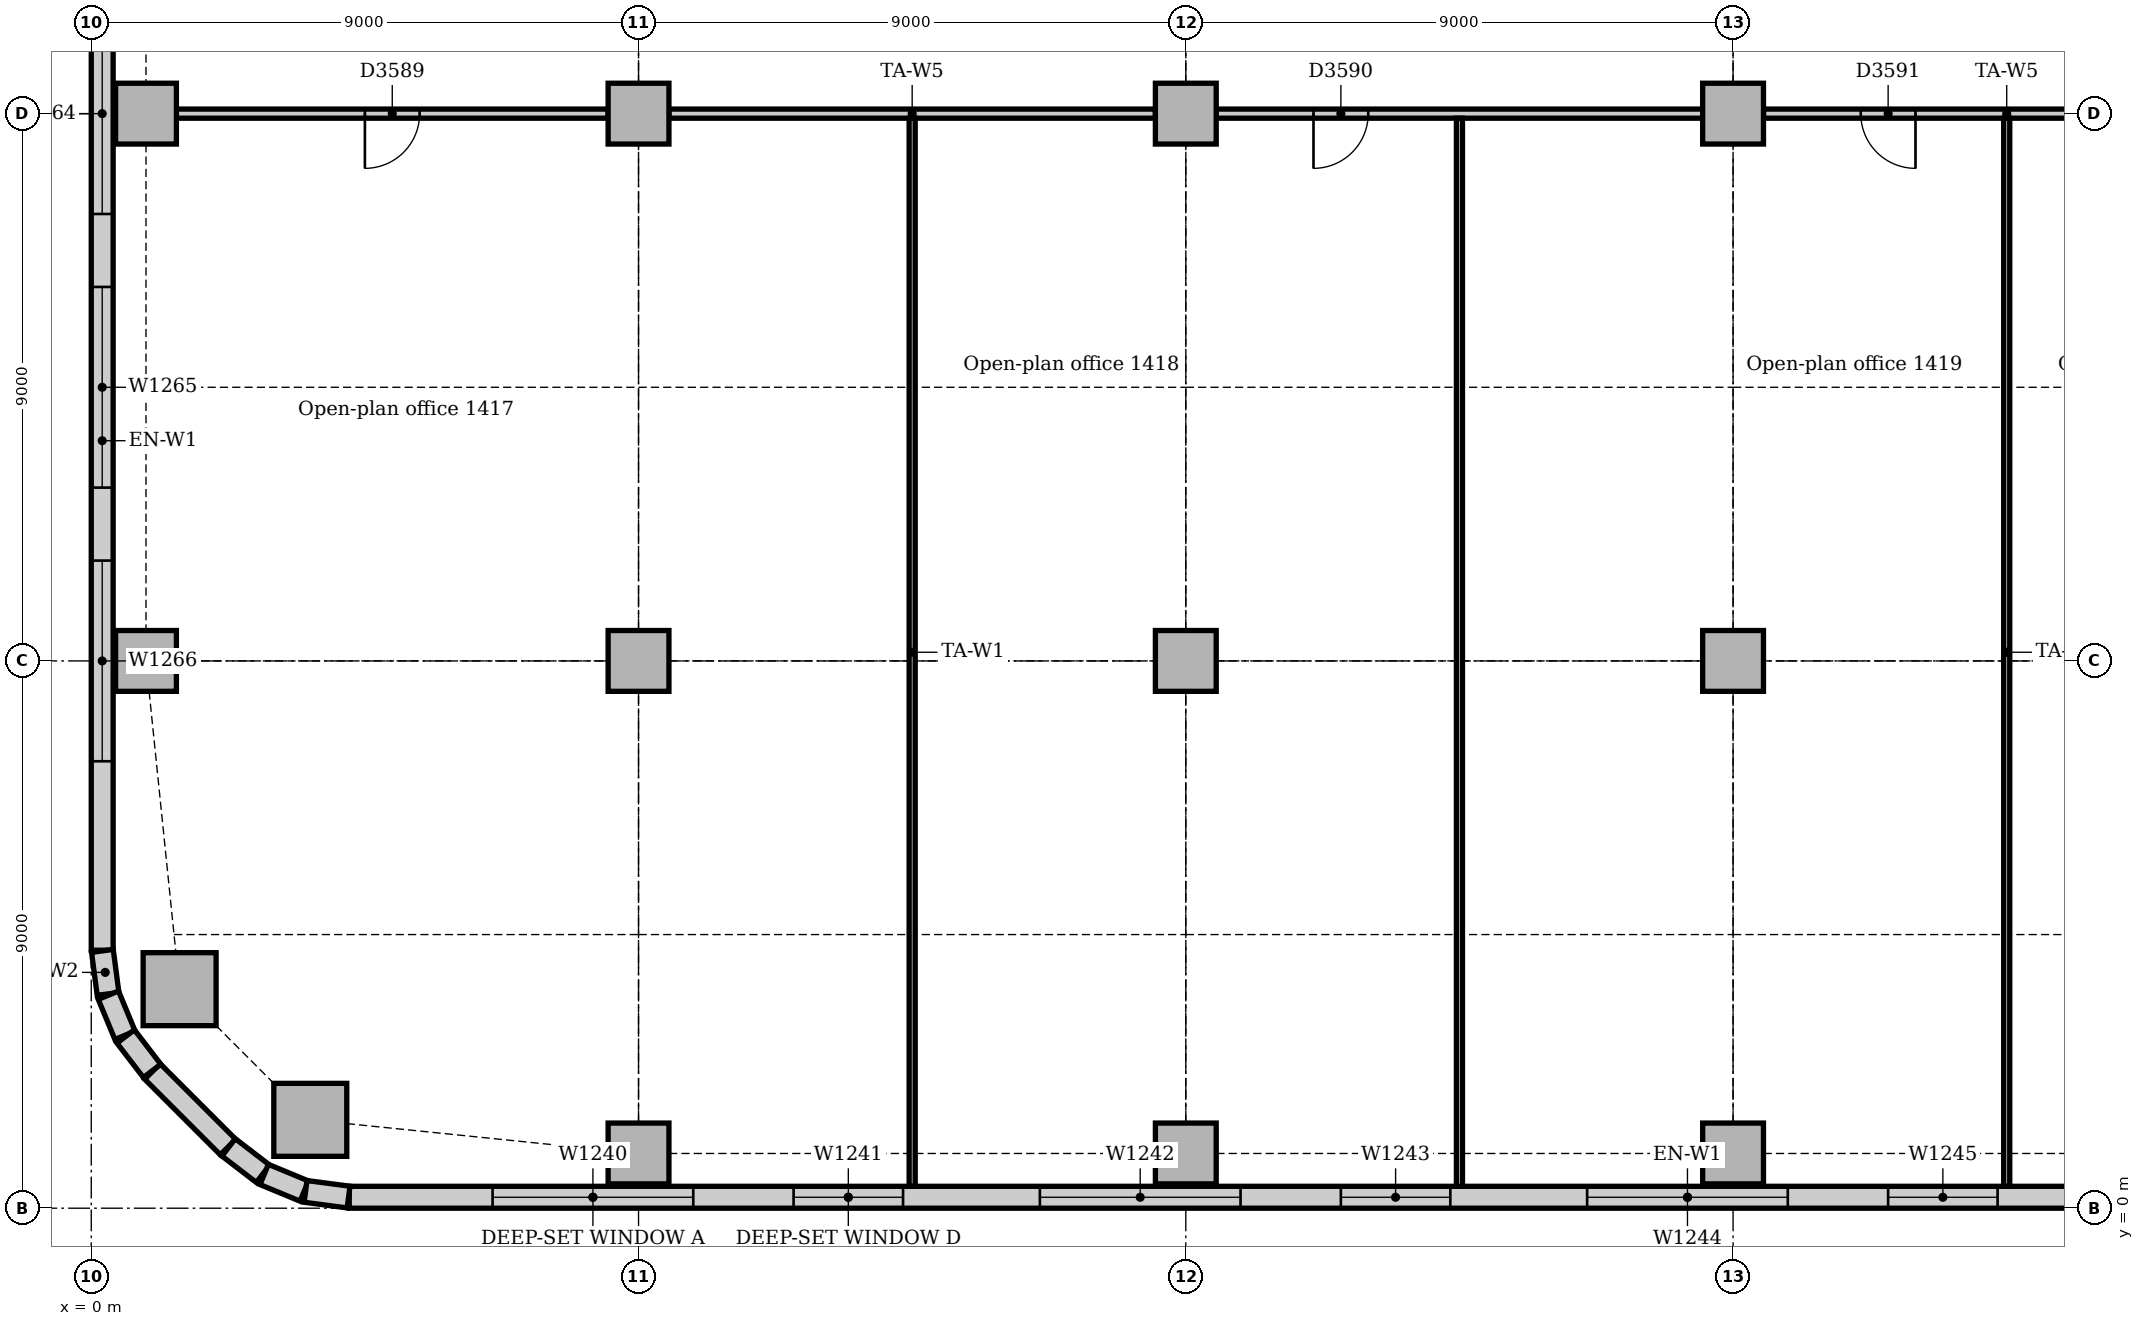
"""IFC4 building model, lengths in metres.
Left out: names, types, materials, properties, quantities, classifications, styles, units other than length and angle.
Written with IfcOpenShell. Run it as: python <this file> out.ifc"""

import sys

from ifc_helpers import new_model, si_unit, direction, frame, frame_2d, origin, origin_2d, place, context, subcontext, project, spatial, rectangle, extrude, element, fill, save


model = new_model("IFC4")
c1 = context("Model", 3, precision=1e-05, world=origin(), true_north=direction((0.0, 1.0)))
c2 = subcontext(c1, "Body", "Model", "MODEL_VIEW")
j1 = project(units=[si_unit("LENGTHUNIT", "METRE"), si_unit("PLANEANGLEUNIT", "RADIAN")], contexts=[c1])
p1 = place(None, origin())
s1 = spatial("IfcSite", under=j1, at=p1, CompositionType="ELEMENT")
p2 = place(p1, origin())
s2 = spatial("IfcBuilding", under=s1, at=p2, CompositionType="ELEMENT")
p3 = place(p2, frame((0.0, 0.0, 63.0)))
s3 = spatial("IfcBuildingStorey", under=s2, at=p3, CompositionType="ELEMENT", Elevation=63.0)
for number, where, z_axis, x_axis in (
    (1, (3.602, 1.453, 0.0), (0.0, 0.0, 1.0), (1.0, 0.0, 0.0)),
    (2, (1.453, 3.602, 0.0), (0.0, 0.0, 1.0), (1.0, 0.0, 0.0)),
):
    element("IfcColumn", number, at=place(p3, frame(where, z_axis=z_axis, x_axis=x_axis)), inside=s3, PredefinedType="COLUMN", context=c2, shape_type="SweptSolid", body=[
        extrude(rectangle(XDim=1.2, YDim=1.2, at=origin_2d()), origin(), (0.0, 0.0, 1.0), 3.85),
    ])
for number, where, z_axis, x_axis in (
    (3, (9.0, 0.9, 0.0), (0.0, 0.0, 1.0), (1.0, 0.0, 0.0)),
    (4, (18.0, 0.9, 0.0), (0.0, 0.0, 1.0), (1.0, 0.0, 0.0)),
    (5, (27.0, 0.9, 0.0), (0.0, 0.0, 1.0), (1.0, 0.0, 0.0)),
    (6, (0.9, 9.0, 0.0), (0.0, 0.0, 1.0), (1.0, 0.0, 0.0)),
    (7, (0.9, 18.0, 0.0), (0.0, 0.0, 1.0), (1.0, 0.0, 0.0)),
    (8, (9.0, 9.0, 0.0), (0.0, 0.0, 1.0), (1.0, 0.0, 0.0)),
    (9, (9.0, 18.0, 0.0), (0.0, 0.0, 1.0), (1.0, 0.0, 0.0)),
    (10, (18.0, 9.0, 0.0), (0.0, 0.0, 1.0), (1.0, 0.0, 0.0)),
    (11, (18.0, 18.0, 0.0), (0.0, 0.0, 1.0), (1.0, 0.0, 0.0)),
    (12, (27.0, 9.0, 0.0), (0.0, 0.0, 1.0), (1.0, 0.0, 0.0)),
    (13, (27.0, 18.0, 0.0), (0.0, 0.0, 1.0), (1.0, 0.0, 0.0)),
):
    element("IfcColumn", number, at=place(p3, frame(where, z_axis=z_axis, x_axis=x_axis)), inside=s3, PredefinedType="COLUMN", context=c2, shape_type="SweptSolid", body=[
        extrude(rectangle(XDim=1.0, YDim=1.0, at=origin_2d()), origin(), (0.0, 0.0, 1.0), 3.85),
    ])
p4 = place(p3, frame((4.243, 0.18, 0.0), z_axis=(0.0, 0.0, 1.0), x_axis=(1.0, 0.0, 0.0)))
e14 = element("IfcWall", 14, at=p4, inside=s3, PredefinedType="STANDARD", context=c2, shape_type="SweptSolid", body=[
    extrude(rectangle(XDim=44.015, YDim=0.36, at=frame_2d((22.007, 0.0))), origin(), (0.0, 0.0, 1.0), 3.85),
])
p5 = place(p4, frame((2.357, 0.0, 0.9)))
e15 = element("IfcOpeningElement", 15, at=p5, cuts=e14, PredefinedType="OPENING", context=c2, shape_type="SweptSolid", body=[
    extrude(rectangle(XDim=3.3, YDim=1.6, at=frame_2d((1.65, 0.8))), frame((0.0, 0.19, 0.0), z_axis=(0.0, -1.0, 0.0), x_axis=(1.0, 0.0, 0.0)), (0.0, 0.0, 1.0), 0.38),
])
p6 = place(p4, frame((7.307, 0.0, 0.9)))
e16 = element("IfcOpeningElement", 16, at=p6, cuts=e14, PredefinedType="OPENING", context=c2, shape_type="SweptSolid", body=[
    extrude(rectangle(XDim=1.8, YDim=1.6, at=frame_2d((0.9, 0.8))), frame((0.0, 0.19, 0.0), z_axis=(0.0, -1.0, 0.0), x_axis=(1.0, 0.0, 0.0)), (0.0, 0.0, 1.0), 0.38),
])
p7 = place(p4, frame((11.357, 0.0, 0.9)))
e17 = element("IfcOpeningElement", 17, at=p7, cuts=e14, PredefinedType="OPENING", context=c2, shape_type="SweptSolid", body=[
    extrude(rectangle(XDim=3.3, YDim=1.6, at=frame_2d((1.65, 0.8))), frame((0.0, 0.19, 0.0), z_axis=(0.0, -1.0, 0.0), x_axis=(1.0, 0.0, 0.0)), (0.0, 0.0, 1.0), 0.38),
])
p8 = place(p4, frame((16.307, 0.0, 0.9)))
e18 = element("IfcOpeningElement", 18, at=p8, cuts=e14, PredefinedType="OPENING", context=c2, shape_type="SweptSolid", body=[
    extrude(rectangle(XDim=1.8, YDim=1.6, at=frame_2d((0.9, 0.8))), frame((0.0, 0.19, 0.0), z_axis=(0.0, -1.0, 0.0), x_axis=(1.0, 0.0, 0.0)), (0.0, 0.0, 1.0), 0.38),
])
p9 = place(p4, frame((20.357, 0.0, 0.9)))
e19 = element("IfcOpeningElement", 19, at=p9, cuts=e14, PredefinedType="OPENING", context=c2, shape_type="SweptSolid", body=[
    extrude(rectangle(XDim=3.3, YDim=1.6, at=frame_2d((1.65, 0.8))), frame((0.0, 0.19, 0.0), z_axis=(0.0, -1.0, 0.0), x_axis=(1.0, 0.0, 0.0)), (0.0, 0.0, 1.0), 0.38),
])
p10 = place(p4, frame((25.307, 0.0, 0.9)))
e20 = element("IfcOpeningElement", 20, at=p10, cuts=e14, PredefinedType="OPENING", context=c2, shape_type="SweptSolid", body=[
    extrude(rectangle(XDim=1.8, YDim=1.6, at=frame_2d((0.9, 0.8))), frame((0.0, 0.19, 0.0), z_axis=(0.0, -1.0, 0.0), x_axis=(1.0, 0.0, 0.0)), (0.0, 0.0, 1.0), 0.38),
])
p11 = place(p4, frame((29.357, 0.0, 0.9)))
e21 = element("IfcOpeningElement", 21, at=p11, cuts=e14, PredefinedType="OPENING", context=c2, shape_type="SweptSolid", body=[
    extrude(rectangle(XDim=3.3, YDim=1.6, at=frame_2d((1.65, 0.8))), frame((0.0, 0.19, 0.0), z_axis=(0.0, -1.0, 0.0), x_axis=(1.0, 0.0, 0.0)), (0.0, 0.0, 1.0), 0.38),
])
p12 = place(p4, frame((34.307, 0.0, 0.9)))
e22 = element("IfcOpeningElement", 22, at=p12, cuts=e14, PredefinedType="OPENING", context=c2, shape_type="SweptSolid", body=[
    extrude(rectangle(XDim=1.8, YDim=1.6, at=frame_2d((0.9, 0.8))), frame((0.0, 0.19, 0.0), z_axis=(0.0, -1.0, 0.0), x_axis=(1.0, 0.0, 0.0)), (0.0, 0.0, 1.0), 0.38),
])
p13 = place(p4, frame((38.357, 0.0, 0.9)))
e23 = element("IfcOpeningElement", 23, at=p13, cuts=e14, PredefinedType="OPENING", context=c2, shape_type="SweptSolid", body=[
    extrude(rectangle(XDim=3.3, YDim=1.6, at=frame_2d((1.65, 0.8))), frame((0.0, 0.19, 0.0), z_axis=(0.0, -1.0, 0.0), x_axis=(1.0, 0.0, 0.0)), (0.0, 0.0, 1.0), 0.38),
])
p14 = place(p3, frame((0.18, 21.0, 0.0), z_axis=(0.0, 0.0, 1.0), x_axis=(0.0, -1.0, 0.0)))
e24 = element("IfcWall", 24, at=p14, inside=s3, PredefinedType="STANDARD", context=c2, shape_type="SweptSolid", body=[
    extrude(rectangle(XDim=16.757, YDim=0.36, at=frame_2d((8.379, 0.0))), origin(), (0.0, 0.0, 1.0), 3.85),
])
p15 = place(p14, frame((1.35, 0.0, 0.9)))
e25 = element("IfcOpeningElement", 25, at=p15, cuts=e24, PredefinedType="OPENING", context=c2, shape_type="SweptSolid", body=[
    extrude(rectangle(XDim=3.3, YDim=1.6, at=frame_2d((1.65, 0.8))), frame((0.0, 0.19, 0.0), z_axis=(0.0, -1.0, 0.0), x_axis=(1.0, 0.0, 0.0)), (0.0, 0.0, 1.0), 0.38),
])
p16 = place(p14, frame((5.85, 0.0, 0.9)))
e26 = element("IfcOpeningElement", 26, at=p16, cuts=e24, PredefinedType="OPENING", context=c2, shape_type="SweptSolid", body=[
    extrude(rectangle(XDim=3.3, YDim=1.6, at=frame_2d((1.65, 0.8))), frame((0.0, 0.19, 0.0), z_axis=(0.0, -1.0, 0.0), x_axis=(1.0, 0.0, 0.0)), (0.0, 0.0, 1.0), 0.38),
])
p17 = place(p14, frame((10.35, 0.0, 0.9)))
e27 = element("IfcOpeningElement", 27, at=p17, cuts=e24, PredefinedType="OPENING", context=c2, shape_type="SweptSolid", body=[
    extrude(rectangle(XDim=3.3, YDim=1.6, at=frame_2d((1.65, 0.8))), frame((0.0, 0.19, 0.0), z_axis=(0.0, -1.0, 0.0), x_axis=(1.0, 0.0, 0.0)), (0.0, 0.0, 1.0), 0.38),
])
p18 = place(p3, frame((1.006, 2.249, 0.0), z_axis=(0.0, 0.0, 1.0), x_axis=(0.707106781187, -0.707106781187, 0.0)))
e28 = element("IfcWall", 28, at=p18, inside=s3, PredefinedType="STANDARD", context=c2, shape_type="SweptSolid", body=[
    extrude(rectangle(XDim=1.757, YDim=0.36, at=frame_2d((0.879, 0.0))), origin(), (0.0, 0.0, 1.0), 3.85),
])
for number, where, z_axis, x_axis in (
    (29, (0.183, 4.231, 0.0), (0.0, 0.0, 1.0), (0.131, -0.991, 0.0)),
    (30, (0.282, 3.503, 0.0), (0.0, 0.0, 1.0), (0.383, -0.924, 0.0)),
):
    element("IfcWall", number, at=place(p3, frame(where, z_axis=z_axis, x_axis=x_axis)), inside=s3, PredefinedType="STANDARD", context=c2, shape_type="SweptSolid", body=[
        extrude(rectangle(XDim=0.713, YDim=0.36, at=frame_2d((0.356, 0.0))), origin(), (0.0, 0.0, 1.0), 3.85),
    ])
for number, where, z_axis, x_axis in (
    (31, (0.566, 2.825, 0.0), (0.0, 0.0, 1.0), (0.609, -0.793, 0.0)),
    (32, (2.259, 1.0, 0.0), (0.0, 0.0, 1.0), (0.793, -0.609, 0.0)),
):
    element("IfcWall", number, at=place(p3, frame(where, z_axis=z_axis, x_axis=x_axis)), inside=s3, PredefinedType="STANDARD", context=c2, shape_type="SweptSolid", body=[
        extrude(rectangle(XDim=0.713, YDim=0.36, at=frame_2d((0.357, 0.0))), origin(), (0.0, 0.0, 1.0), 3.85),
    ])
for number, where, z_axis, x_axis in (
    (33, (2.844, 0.555, 0.0), (0.0, 0.0, 1.0), (0.924, -0.383, 0.0)),
    (34, (3.524, 0.276, 0.0), (0.0, 0.0, 1.0), (0.991, -0.131, 0.0)),
):
    element("IfcWall", number, at=place(p3, frame(where, z_axis=z_axis, x_axis=x_axis)), inside=s3, PredefinedType="STANDARD", context=c2, shape_type="SweptSolid", body=[
        extrude(rectangle(XDim=0.713, YDim=0.36, at=frame_2d((0.356, 0.0))), origin(), (0.0, 0.0, 1.0), 3.85),
    ])
p19 = place(p3, frame((27.5, 18.0, 0.0), z_axis=(0.0, 0.0, 1.0), x_axis=(1.0, 0.0, 0.0)))
e35 = element("IfcWall", 35, at=p19, inside=s3, PredefinedType="PARTITIONING", context=c2, shape_type="SweptSolid", body=[
    extrude(rectangle(XDim=8.0, YDim=0.15, at=frame_2d((4.0, 0.0))), origin(), (0.0, 0.0, 1.0), 3.15),
])
p20 = place(p19, frame((1.6, 0.0, 0.0)))
e36 = element("IfcOpeningElement", 36, at=p20, cuts=e35, PredefinedType="OPENING", context=c2, shape_type="SweptSolid", body=[
    extrude(rectangle(XDim=0.9, YDim=2.1, at=frame_2d((0.45, 1.05))), frame((0.0, 0.085, 0.0), z_axis=(0.0, -1.0, 0.0), x_axis=(1.0, 0.0, 0.0)), (0.0, 0.0, 1.0), 0.17),
])
p21 = place(p3, frame((18.5, 18.0, 0.0), z_axis=(0.0, 0.0, 1.0), x_axis=(1.0, 0.0, 0.0)))
e37 = element("IfcWall", 37, at=p21, inside=s3, PredefinedType="PARTITIONING", context=c2, shape_type="SweptSolid", body=[
    extrude(rectangle(XDim=8.0, YDim=0.15, at=frame_2d((4.0, 0.0))), origin(), (0.0, 0.0, 1.0), 3.15),
])
p22 = place(p21, frame((1.6, 0.0, 0.0)))
e38 = element("IfcOpeningElement", 38, at=p22, cuts=e37, PredefinedType="OPENING", context=c2, shape_type="SweptSolid", body=[
    extrude(rectangle(XDim=0.9, YDim=2.1, at=frame_2d((0.45, 1.05))), frame((0.0, 0.085, 0.0), z_axis=(0.0, -1.0, 0.0), x_axis=(1.0, 0.0, 0.0)), (0.0, 0.0, 1.0), 0.17),
])
p23 = place(p3, frame((9.5, 18.0, 0.0), z_axis=(0.0, 0.0, 1.0), x_axis=(1.0, 0.0, 0.0)))
e39 = element("IfcWall", 39, at=p23, inside=s3, PredefinedType="PARTITIONING", context=c2, shape_type="SweptSolid", body=[
    extrude(rectangle(XDim=8.0, YDim=0.15, at=frame_2d((4.0, 0.0))), origin(), (0.0, 0.0, 1.0), 3.15),
])
p24 = place(p3, frame((1.4, 18.0, 0.0), z_axis=(0.0, 0.0, 1.0), x_axis=(1.0, 0.0, 0.0)))
e40 = element("IfcWall", 40, at=p24, inside=s3, PredefinedType="PARTITIONING", context=c2, shape_type="SweptSolid", body=[
    extrude(rectangle(XDim=7.1, YDim=0.15, at=frame_2d((3.55, 0.0))), origin(), (0.0, 0.0, 1.0), 3.15),
])
p25 = place(p24, frame((3.1, 0.0, 0.0)))
e41 = element("IfcOpeningElement", 41, at=p25, cuts=e40, PredefinedType="OPENING", context=c2, shape_type="SweptSolid", body=[
    extrude(rectangle(XDim=0.9, YDim=2.1, at=frame_2d((0.45, 1.05))), frame((0.0, 0.085, 0.0), z_axis=(0.0, -1.0, 0.0), x_axis=(1.0, 0.0, 0.0)), (0.0, 0.0, 1.0), 0.17),
])
for number, where, z_axis, x_axis in (
    (42, (13.5, 0.36, 0.0), (0.0, 0.0, 1.0), (0.0, 1.0, 0.0)),
    (43, (22.5, 0.36, 0.0), (0.0, 0.0, 1.0), (0.0, 1.0, 0.0)),
    (44, (31.5, 0.36, 0.0), (0.0, 0.0, 1.0), (0.0, 1.0, 0.0)),
):
    element("IfcWall", number, at=place(p3, frame(where, z_axis=z_axis, x_axis=x_axis)), inside=s3, PredefinedType="PARTITIONING", context=c2, shape_type="SweptSolid", body=[
        extrude(rectangle(XDim=17.565, YDim=0.1, at=frame_2d((8.783, 0.0))), origin(), (0.0, 0.0, 1.0), 3.85),
    ])
p26 = place(p5, origin())
e45 = element("IfcWindow", 45, at=p26, inside=s3, PartitioningType="SINGLE_PANEL", PredefinedType="WINDOW", context=c2, shape_type="SweptSolid", body=[
    extrude(rectangle(XDim=3.3, YDim=1.6, at=frame_2d((1.65, 0.8))), frame((0.0, 0.13, 0.0), z_axis=(0.0, -1.0, 0.0), x_axis=(1.0, 0.0, 0.0)), (0.0, 0.0, 1.0), 0.06),
])
fill(e15, e45)
p27 = place(p6, origin())
e46 = element("IfcWindow", 46, at=p27, inside=s3, PartitioningType="SINGLE_PANEL", PredefinedType="WINDOW", context=c2, shape_type="SweptSolid", body=[
    extrude(rectangle(XDim=1.8, YDim=1.6, at=frame_2d((0.9, 0.8))), frame((0.0, 0.13, 0.0), z_axis=(0.0, -1.0, 0.0), x_axis=(1.0, 0.0, 0.0)), (0.0, 0.0, 1.0), 0.06),
])
fill(e16, e46)
p28 = place(p7, origin())
e47 = element("IfcWindow", 47, at=p28, inside=s3, PartitioningType="SINGLE_PANEL", PredefinedType="WINDOW", context=c2, shape_type="SweptSolid", body=[
    extrude(rectangle(XDim=3.3, YDim=1.6, at=frame_2d((1.65, 0.8))), frame((0.0, 0.13, 0.0), z_axis=(0.0, -1.0, 0.0), x_axis=(1.0, 0.0, 0.0)), (0.0, 0.0, 1.0), 0.06),
])
fill(e17, e47)
p29 = place(p8, origin())
e48 = element("IfcWindow", 48, at=p29, inside=s3, PartitioningType="SINGLE_PANEL", PredefinedType="WINDOW", context=c2, shape_type="SweptSolid", body=[
    extrude(rectangle(XDim=1.8, YDim=1.6, at=frame_2d((0.9, 0.8))), frame((0.0, 0.13, 0.0), z_axis=(0.0, -1.0, 0.0), x_axis=(1.0, 0.0, 0.0)), (0.0, 0.0, 1.0), 0.06),
])
fill(e18, e48)
p30 = place(p9, origin())
e49 = element("IfcWindow", 49, at=p30, inside=s3, PartitioningType="SINGLE_PANEL", PredefinedType="WINDOW", context=c2, shape_type="SweptSolid", body=[
    extrude(rectangle(XDim=3.3, YDim=1.6, at=frame_2d((1.65, 0.8))), frame((0.0, 0.13, 0.0), z_axis=(0.0, -1.0, 0.0), x_axis=(1.0, 0.0, 0.0)), (0.0, 0.0, 1.0), 0.06),
])
fill(e19, e49)
p31 = place(p10, origin())
e50 = element("IfcWindow", 50, at=p31, inside=s3, PartitioningType="SINGLE_PANEL", PredefinedType="WINDOW", context=c2, shape_type="SweptSolid", body=[
    extrude(rectangle(XDim=1.8, YDim=1.6, at=frame_2d((0.9, 0.8))), frame((0.0, 0.13, 0.0), z_axis=(0.0, -1.0, 0.0), x_axis=(1.0, 0.0, 0.0)), (0.0, 0.0, 1.0), 0.06),
])
fill(e20, e50)
p32 = place(p15, origin())
e51 = element("IfcWindow", 51, at=p32, inside=s3, PartitioningType="SINGLE_PANEL", PredefinedType="WINDOW", context=c2, shape_type="SweptSolid", body=[
    extrude(rectangle(XDim=3.3, YDim=1.6, at=frame_2d((1.65, 0.8))), frame((0.0, 0.13, 0.0), z_axis=(0.0, -1.0, 0.0), x_axis=(1.0, 0.0, 0.0)), (0.0, 0.0, 1.0), 0.06),
])
fill(e25, e51)
p33 = place(p16, origin())
e52 = element("IfcWindow", 52, at=p33, inside=s3, PartitioningType="SINGLE_PANEL", PredefinedType="WINDOW", context=c2, shape_type="SweptSolid", body=[
    extrude(rectangle(XDim=3.3, YDim=1.6, at=frame_2d((1.65, 0.8))), frame((0.0, 0.13, 0.0), z_axis=(0.0, -1.0, 0.0), x_axis=(1.0, 0.0, 0.0)), (0.0, 0.0, 1.0), 0.06),
])
fill(e26, e52)
p34 = place(p17, origin())
e53 = element("IfcWindow", 53, at=p34, inside=s3, PartitioningType="SINGLE_PANEL", PredefinedType="WINDOW", context=c2, shape_type="SweptSolid", body=[
    extrude(rectangle(XDim=3.3, YDim=1.6, at=frame_2d((1.65, 0.8))), frame((0.0, 0.13, 0.0), z_axis=(0.0, -1.0, 0.0), x_axis=(1.0, 0.0, 0.0)), (0.0, 0.0, 1.0), 0.06),
])
fill(e27, e53)
p35 = place(p25, frame((0.9, 0.0, 0.0), z_axis=(0.0, 0.0, 1.0), x_axis=(-1.0, 0.0, 0.0)))
e54 = element("IfcDoor", 54, at=p35, inside=s3, OperationType="SINGLE_SWING_RIGHT", PredefinedType="DOOR", context=c2, shape_type="SweptSolid", body=[
    extrude(rectangle(XDim=0.9, YDim=2.1, at=frame_2d((0.45, 1.05))), frame((0.0, 0.025, 0.0), z_axis=(0.0, -1.0, 0.0), x_axis=(1.0, 0.0, 0.0)), (0.0, 0.0, 1.0), 0.05),
])
fill(e41, e54)
p36 = place(p22, frame((0.9, 0.0, 0.0), z_axis=(0.0, 0.0, 1.0), x_axis=(-1.0, 0.0, 0.0)))
e55 = element("IfcDoor", 55, at=p36, inside=s3, OperationType="SINGLE_SWING_RIGHT", PredefinedType="DOOR", context=c2, shape_type="SweptSolid", body=[
    extrude(rectangle(XDim=0.9, YDim=2.1, at=frame_2d((0.45, 1.05))), frame((0.0, 0.025, 0.0), z_axis=(0.0, -1.0, 0.0), x_axis=(1.0, 0.0, 0.0)), (0.0, 0.0, 1.0), 0.05),
])
fill(e38, e55)
p37 = place(p20, frame((0.9, 0.0, 0.0), z_axis=(0.0, 0.0, 1.0), x_axis=(-1.0, 0.0, 0.0)))
e56 = element("IfcDoor", 56, at=p37, inside=s3, OperationType="SINGLE_SWING_LEFT", PredefinedType="DOOR", context=c2, shape_type="SweptSolid", body=[
    extrude(rectangle(XDim=0.9, YDim=2.1, at=frame_2d((0.45, 1.05))), frame((0.0, 0.025, 0.0), z_axis=(0.0, -1.0, 0.0), x_axis=(1.0, 0.0, 0.0)), (0.0, 0.0, 1.0), 0.05),
])
fill(e36, e56)
save(model, sys.argv[1])
